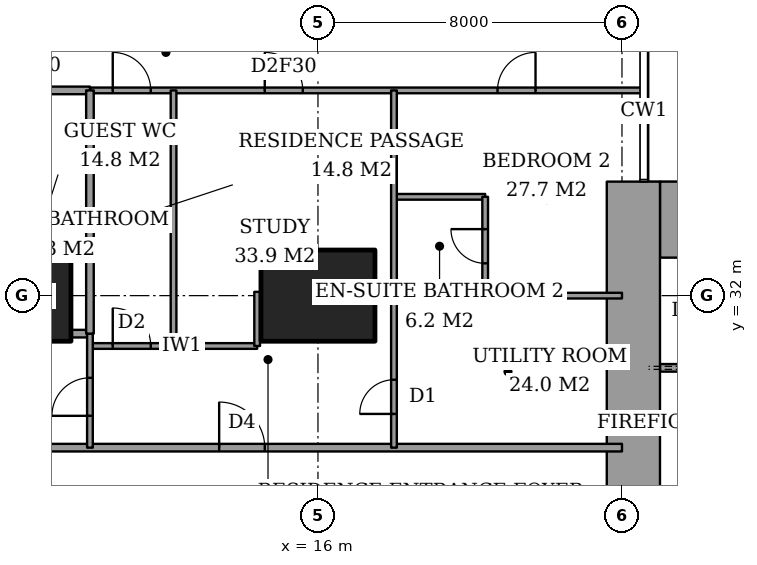
"""IFC4 building model, lengths in metres.
Left out: names, types, materials, properties, quantities, classifications, styles, units other than length and angle.
Written with IfcOpenShell. Run it as: python <this file> out.ifc"""

import sys

from ifc_helpers import new_model, si_unit, direction, frame, frame_2d, origin, origin_2d, place, context, subcontext, project, spatial, rectangle, extrude, element, fill, save


model = new_model("IFC4")
c1 = context("Model", 3, precision=1e-05, world=origin(), true_north=direction((0.0, 1.0)))
c2 = subcontext(c1, "Body", "Model", "MODEL_VIEW")
j1 = project(units=[si_unit("LENGTHUNIT", "METRE"), si_unit("PLANEANGLEUNIT", "RADIAN")], contexts=[c1])
p1 = place(None, origin())
s1 = spatial("IfcSite", under=j1, at=p1, CompositionType="ELEMENT")
p2 = place(p1, origin())
s2 = spatial("IfcBuilding", under=s1, at=p2, CompositionType="ELEMENT")
p3 = place(p2, frame((0.0, 0.0, 87.2)))
s3 = spatial("IfcBuildingStorey", under=s2, at=p3, CompositionType="ELEMENT", Elevation=87.2)
for number, where, z_axis, x_axis in (
    (1, (8.0, 32.0, 0.0), (0.0, 0.0, 1.0), (1.0, 0.0, 0.0)),
    (2, (16.0, 32.0, 0.0), (0.0, 0.0, 1.0), (1.0, 0.0, 0.0)),
):
    element("IfcColumn", number, at=place(p3, frame(where, z_axis=z_axis, x_axis=x_axis)), inside=s3, PredefinedType="COLUMN", context=c2, shape_type="SweptSolid", body=[
        extrude(rectangle(XDim=3.0, YDim=2.4, at=origin_2d()), origin(), (0.0, 0.0, 1.0), 3.6),
    ])
p4 = place(p3, frame((25.0, 34.0, 0.0), z_axis=(0.0, 0.0, 1.0), x_axis=(1.0, 0.0, 0.0)))
e3 = element("IfcWall", 3, at=p4, inside=s3, PredefinedType="SHEAR", context=c2, shape_type="SweptSolid", body=[
    extrude(rectangle(XDim=3.15, YDim=2.0, at=frame_2d((1.575, 0.0))), origin(), (0.0, 0.0, 1.0), 3.6),
])
p5 = place(p3, frame((24.3, 23.15, 0.0), z_axis=(0.0, 0.0, 1.0), x_axis=(0.0, 1.0, 0.0)))
e4 = element("IfcWall", 4, at=p5, inside=s3, PredefinedType="SHEAR", context=c2, shape_type="SweptSolid", body=[
    extrude(rectangle(XDim=11.85, YDim=1.4, at=frame_2d((5.925, 0.0))), origin(), (0.0, 0.0, 1.0), 3.6),
])
p6 = place(p5, frame((0.75, 0.0, 0.0)))
e5 = element("IfcOpeningElement", 5, at=p6, cuts=e4, PredefinedType="OPENING", context=c2, shape_type="SweptSolid", body=[
    extrude(rectangle(XDim=1.8, YDim=2.4, at=frame_2d((0.9, 1.2))), frame((0.0, 0.71, 0.0), z_axis=(0.0, -1.0, 0.0), x_axis=(1.0, 0.0, 0.0)), (0.0, 0.0, 1.0), 1.42),
])
p7 = place(p3, frame((6.725, 28.0, 0.0), z_axis=(0.0, 0.0, 1.0), x_axis=(1.0, 0.0, 0.0)))
e6 = element("IfcWall", 6, at=p7, inside=s3, PredefinedType="PARTITIONING", context=c2, shape_type="SweptSolid", body=[
    extrude(rectangle(XDim=17.275, YDim=0.2, at=frame_2d((8.637, 0.0))), origin(), (0.0, 0.0, 1.0), 3.25),
])
p8 = place(p7, frame((6.675, 0.0, 0.0)))
e7 = element("IfcOpeningElement", 7, at=p8, cuts=e6, PredefinedType="OPENING", context=c2, shape_type="SweptSolid", body=[
    extrude(rectangle(XDim=1.2, YDim=2.4, at=frame_2d((0.6, 1.2))), frame((0.0, 0.11, 0.0), z_axis=(0.0, -1.0, 0.0), x_axis=(1.0, 0.0, 0.0)), (0.0, 0.0, 1.0), 0.22),
])
p9 = place(p3, frame((10.0, 30.675, 0.0), z_axis=(0.0, 0.0, 1.0), x_axis=(1.0, 0.0, 0.0)))
e8 = element("IfcWall", 8, at=p9, inside=s3, PredefinedType="PARTITIONING", context=c2, shape_type="SweptSolid", body=[
    extrude(rectangle(XDim=4.4, YDim=0.15, at=frame_2d((2.2, 0.0))), origin(), (0.0, 0.0, 1.0), 3.25),
])
p10 = place(p9, frame((0.6, 0.0, 0.0)))
e9 = element("IfcOpeningElement", 9, at=p10, cuts=e8, PredefinedType="OPENING", context=c2, shape_type="SweptSolid", body=[
    extrude(rectangle(XDim=1.0, YDim=2.1, at=frame_2d((0.5, 1.05))), frame((0.0, 0.085, 0.0), z_axis=(0.0, -1.0, 0.0), x_axis=(1.0, 0.0, 0.0)), (0.0, 0.0, 1.0), 0.17),
])
p11 = place(p3, frame((9.5, 31.0, 0.0), z_axis=(0.0, 0.0, 1.0), x_axis=(1.0, 0.0, 0.0)))
e10 = element("IfcWall", 10, at=p11, inside=s3, PredefinedType="PARTITIONING", context=c2, shape_type="SweptSolid", body=[
    extrude(rectangle(XDim=0.5, YDim=0.2, at=frame_2d((0.25, 0.0))), origin(), (0.0, 0.0, 1.0), 3.25),
])
p12 = place(p3, frame((18.0, 32.0, 0.0), z_axis=(0.0, 0.0, 1.0), x_axis=(1.0, 0.0, 0.0)))
e11 = element("IfcWall", 11, at=p12, inside=s3, PredefinedType="PARTITIONING", context=c2, shape_type="SweptSolid", body=[
    extrude(rectangle(XDim=6.0, YDim=0.15, at=frame_2d((3.0, 0.0))), origin(), (0.0, 0.0, 1.0), 3.25),
])
p13 = place(p3, frame((17.5, 32.1, 0.0), z_axis=(0.0, 0.0, 1.0), x_axis=(1.0, 0.0, 0.0)))
e12 = element("IfcWall", 12, at=p13, inside=s3, PredefinedType="PARTITIONING", context=c2, shape_type="SweptSolid", body=[
    extrude(rectangle(XDim=0.5, YDim=0.15, at=frame_2d((0.25, 0.0))), origin(), (0.0, 0.0, 1.0), 3.25),
])
p14 = place(p3, frame((18.0, 34.6, 0.0), z_axis=(0.0, 0.0, 1.0), x_axis=(1.0, 0.0, 0.0)))
e13 = element("IfcWall", 13, at=p14, inside=s3, PredefinedType="PARTITIONING", context=c2, shape_type="SweptSolid", body=[
    extrude(rectangle(XDim=2.4, YDim=0.15, at=frame_2d((1.2, 0.0))), origin(), (0.0, 0.0, 1.0), 3.25),
])
p15 = place(p3, frame((6.725, 37.4, 0.0), z_axis=(0.0, 0.0, 1.0), x_axis=(1.0, 0.0, 0.0)))
e14 = element("IfcWall", 14, at=p15, inside=s3, PredefinedType="PARTITIONING", context=c2, shape_type="SweptSolid", body=[
    extrude(rectangle(XDim=3.275, YDim=0.2, at=frame_2d((1.637, 0.0))), origin(), (0.0, 0.0, 1.0), 3.25),
])
p16 = place(p15, frame((1.188, 0.0, 0.0)))
e15 = element("IfcOpeningElement", 15, at=p16, cuts=e14, PredefinedType="OPENING", context=c2, shape_type="SweptSolid", body=[
    extrude(rectangle(XDim=0.9, YDim=2.1, at=frame_2d((0.45, 1.05))), frame((0.0, 0.11, 0.0), z_axis=(0.0, -1.0, 0.0), x_axis=(1.0, 0.0, 0.0)), (0.0, 0.0, 1.0), 0.22),
])
p17 = place(p3, frame((10.0, 37.4, 0.0), z_axis=(0.0, 0.0, 1.0), x_axis=(1.0, 0.0, 0.0)))
e16 = element("IfcWall", 16, at=p17, inside=s3, PredefinedType="PARTITIONING", context=c2, shape_type="SweptSolid", body=[
    extrude(rectangle(XDim=14.561, YDim=0.15, at=frame_2d((7.281, 0.0))), origin(), (0.0, 0.0, 1.0), 3.25),
])
p18 = place(p17, frame((0.6, 0.0, 0.0)))
e17 = element("IfcOpeningElement", 17, at=p18, cuts=e16, PredefinedType="OPENING", context=c2, shape_type="SweptSolid", body=[
    extrude(rectangle(XDim=1.0, YDim=2.1, at=frame_2d((0.5, 1.05))), frame((0.0, 0.085, 0.0), z_axis=(0.0, -1.0, 0.0), x_axis=(1.0, 0.0, 0.0)), (0.0, 0.0, 1.0), 0.17),
])
p19 = place(p17, frame((4.6, 0.0, 0.0)))
e18 = element("IfcOpeningElement", 18, at=p19, cuts=e16, PredefinedType="OPENING", context=c2, shape_type="SweptSolid", body=[
    extrude(rectangle(XDim=1.0, YDim=2.1, at=frame_2d((0.5, 1.05))), frame((0.0, 0.085, 0.0), z_axis=(0.0, -1.0, 0.0), x_axis=(1.0, 0.0, 0.0)), (0.0, 0.0, 1.0), 0.17),
])
p20 = place(p17, frame((10.725, 0.0, 0.0)))
e19 = element("IfcOpeningElement", 19, at=p20, cuts=e16, PredefinedType="OPENING", context=c2, shape_type="SweptSolid", body=[
    extrude(rectangle(XDim=1.0, YDim=2.1, at=frame_2d((0.5, 1.05))), frame((0.0, 0.085, 0.0), z_axis=(0.0, -1.0, 0.0), x_axis=(1.0, 0.0, 0.0)), (0.0, 0.0, 1.0), 0.17),
])
p21 = place(p3, frame((10.0, 31.0, 0.0), z_axis=(0.0, 0.0, 1.0), x_axis=(0.0, 1.0, 0.0)))
e20 = element("IfcWall", 20, at=p21, inside=s3, PredefinedType="PARTITIONING", context=c2, shape_type="SweptSolid", body=[
    extrude(rectangle(XDim=6.4, YDim=0.2, at=frame_2d((3.2, 0.0))), origin(), (0.0, 0.0, 1.0), 3.25),
])
p22 = place(p3, frame((10.0, 28.0, 0.0), z_axis=(0.0, 0.0, 1.0), x_axis=(0.0, 1.0, 0.0)))
e21 = element("IfcWall", 21, at=p22, inside=s3, PredefinedType="PARTITIONING", context=c2, shape_type="SweptSolid", body=[
    extrude(rectangle(XDim=3.0, YDim=0.15, at=frame_2d((1.5, 0.0))), origin(), (0.0, 0.0, 1.0), 3.25),
])
p23 = place(p22, frame((0.837, 0.0, 0.0)))
e22 = element("IfcOpeningElement", 22, at=p23, cuts=e21, PredefinedType="OPENING", context=c2, shape_type="SweptSolid", body=[
    extrude(rectangle(XDim=1.0, YDim=2.1, at=frame_2d((0.5, 1.05))), frame((0.0, 0.085, 0.0), z_axis=(0.0, -1.0, 0.0), x_axis=(1.0, 0.0, 0.0)), (0.0, 0.0, 1.0), 0.17),
])
p24 = place(p3, frame((12.2, 30.675, 0.0), z_axis=(0.0, 0.0, 1.0), x_axis=(0.0, 1.0, 0.0)))
e23 = element("IfcWall", 23, at=p24, inside=s3, PredefinedType="PARTITIONING", context=c2, shape_type="SweptSolid", body=[
    extrude(rectangle(XDim=6.725, YDim=0.15, at=frame_2d((3.362, 0.0))), origin(), (0.0, 0.0, 1.0), 3.25),
])
p25 = place(p3, frame((14.4, 30.675, 0.0), z_axis=(0.0, 0.0, 1.0), x_axis=(0.0, 1.0, 0.0)))
e24 = element("IfcWall", 24, at=p25, inside=s3, PredefinedType="PARTITIONING", context=c2, shape_type="SweptSolid", body=[
    extrude(rectangle(XDim=1.425, YDim=0.15, at=frame_2d((0.712, 0.0))), origin(), (0.0, 0.0, 1.0), 3.25),
])
p26 = place(p3, frame((18.0, 28.0, 0.0), z_axis=(0.0, 0.0, 1.0), x_axis=(0.0, 1.0, 0.0)))
e25 = element("IfcWall", 25, at=p26, inside=s3, PredefinedType="PARTITIONING", context=c2, shape_type="SweptSolid", body=[
    extrude(rectangle(XDim=9.4, YDim=0.15, at=frame_2d((4.7, 0.0))), origin(), (0.0, 0.0, 1.0), 3.25),
])
p27 = place(p26, frame((0.887, 0.0, 0.0)))
e26 = element("IfcOpeningElement", 26, at=p27, cuts=e25, PredefinedType="OPENING", context=c2, shape_type="SweptSolid", body=[
    extrude(rectangle(XDim=0.9, YDim=2.1, at=frame_2d((0.45, 1.05))), frame((0.0, 0.085, 0.0), z_axis=(0.0, -1.0, 0.0), x_axis=(1.0, 0.0, 0.0)), (0.0, 0.0, 1.0), 0.17),
])
p28 = place(p3, frame((20.4, 32.0, 0.0), z_axis=(0.0, 0.0, 1.0), x_axis=(0.0, 1.0, 0.0)))
e27 = element("IfcWall", 27, at=p28, inside=s3, PredefinedType="PARTITIONING", context=c2, shape_type="SweptSolid", body=[
    extrude(rectangle(XDim=2.6, YDim=0.15, at=frame_2d((1.3, 0.0))), origin(), (0.0, 0.0, 1.0), 3.25),
])
p29 = place(p28, frame((0.85, 0.0, 0.0)))
e28 = element("IfcOpeningElement", 28, at=p29, cuts=e27, PredefinedType="OPENING", context=c2, shape_type="SweptSolid", body=[
    extrude(rectangle(XDim=0.9, YDim=2.1, at=frame_2d((0.45, 1.05))), frame((0.0, 0.085, 0.0), z_axis=(0.0, -1.0, 0.0), x_axis=(1.0, 0.0, 0.0)), (0.0, 0.0, 1.0), 0.17),
])
p30 = place(p3, frame((25.0, 30.1, 0.0), z_axis=(0.0, 0.0, 1.0), x_axis=(1.0, 0.0, 0.0)))
e29 = element("IfcWall", 29, at=p30, inside=s3, PredefinedType="PARTITIONING", context=c2, shape_type="SweptSolid", body=[
    extrude(rectangle(XDim=12.7, YDim=0.2, at=frame_2d((6.35, 0.0))), origin(), (0.0, 0.0, 1.0), 3.6),
])
p31 = place(p30, frame((0.9, 0.0, 0.0)))
e30 = element("IfcOpeningElement", 30, at=p31, cuts=e29, PredefinedType="OPENING", context=c2, shape_type="SweptSolid", body=[
    extrude(rectangle(XDim=1.2, YDim=2.1, at=frame_2d((0.6, 1.05))), frame((0.0, 0.11, 0.0), z_axis=(0.0, -1.0, 0.0), x_axis=(1.0, 0.0, 0.0)), (0.0, 0.0, 1.0), 0.22),
])
p32 = place(p18, origin())
e31 = element("IfcDoor", 31, at=p32, inside=s3, OperationType="SINGLE_SWING_RIGHT", PredefinedType="DOOR", context=c2, shape_type="SweptSolid", body=[
    extrude(rectangle(XDim=1.0, YDim=2.1, at=frame_2d((0.5, 1.05))), frame((0.0, 0.025, 0.0), z_axis=(0.0, -1.0, 0.0), x_axis=(1.0, 0.0, 0.0)), (0.0, 0.0, 1.0), 0.05),
])
fill(e17, e31)
p33 = place(p23, origin())
e32 = element("IfcDoor", 32, at=p33, inside=s3, OperationType="SINGLE_SWING_RIGHT", PredefinedType="DOOR", context=c2, shape_type="SweptSolid", body=[
    extrude(rectangle(XDim=1.0, YDim=2.1, at=frame_2d((0.5, 1.05))), frame((0.0, 0.025, 0.0), z_axis=(0.0, -1.0, 0.0), x_axis=(1.0, 0.0, 0.0)), (0.0, 0.0, 1.0), 0.05),
])
fill(e22, e32)
p34 = place(p8, origin())
e33 = element("IfcDoor", 33, at=p34, inside=s3, OperationType="SINGLE_SWING_RIGHT", PredefinedType="DOOR", context=c2, shape_type="SweptSolid", body=[
    extrude(rectangle(XDim=1.2, YDim=2.4, at=frame_2d((0.6, 1.2))), frame((0.0, 0.025, 0.0), z_axis=(0.0, -1.0, 0.0), x_axis=(1.0, 0.0, 0.0)), (0.0, 0.0, 1.0), 0.05),
])
fill(e7, e33)
p35 = place(p10, origin())
e34 = element("IfcDoor", 34, at=p35, inside=s3, OperationType="SINGLE_SWING_RIGHT", PredefinedType="DOOR", context=c2, shape_type="SweptSolid", body=[
    extrude(rectangle(XDim=1.0, YDim=2.1, at=frame_2d((0.5, 1.05))), frame((0.0, 0.025, 0.0), z_axis=(0.0, -1.0, 0.0), x_axis=(1.0, 0.0, 0.0)), (0.0, 0.0, 1.0), 0.05),
])
fill(e9, e34)
p36 = place(p19, origin())
e35 = element("IfcDoor", 35, at=p36, inside=s3, OperationType="SINGLE_SWING_RIGHT", PredefinedType="DOOR", context=c2, shape_type="SweptSolid", body=[
    extrude(rectangle(XDim=1.0, YDim=2.1, at=frame_2d((0.5, 1.05))), frame((0.0, 0.025, 0.0), z_axis=(0.0, -1.0, 0.0), x_axis=(1.0, 0.0, 0.0)), (0.0, 0.0, 1.0), 0.05),
])
fill(e18, e35)
p37 = place(p29, origin())
e36 = element("IfcDoor", 36, at=p37, inside=s3, OperationType="SINGLE_SWING_LEFT", PredefinedType="DOOR", context=c2, shape_type="SweptSolid", body=[
    extrude(rectangle(XDim=0.9, YDim=2.1, at=frame_2d((0.45, 1.05))), frame((0.0, 0.025, 0.0), z_axis=(0.0, -1.0, 0.0), x_axis=(1.0, 0.0, 0.0)), (0.0, 0.0, 1.0), 0.05),
])
fill(e28, e36)
p38 = place(p20, origin())
e37 = element("IfcDoor", 37, at=p38, inside=s3, OperationType="SINGLE_SWING_LEFT", PredefinedType="DOOR", context=c2, shape_type="SweptSolid", body=[
    extrude(rectangle(XDim=1.0, YDim=2.1, at=frame_2d((0.5, 1.05))), frame((0.0, 0.025, 0.0), z_axis=(0.0, -1.0, 0.0), x_axis=(1.0, 0.0, 0.0)), (0.0, 0.0, 1.0), 0.05),
])
fill(e19, e37)
p39 = place(p27, origin())
e38 = element("IfcDoor", 38, at=p39, inside=s3, OperationType="SINGLE_SWING_RIGHT", PredefinedType="DOOR", context=c2, shape_type="SweptSolid", body=[
    extrude(rectangle(XDim=0.9, YDim=2.1, at=frame_2d((0.45, 1.05))), frame((0.0, 0.025, 0.0), z_axis=(0.0, -1.0, 0.0), x_axis=(1.0, 0.0, 0.0)), (0.0, 0.0, 1.0), 0.05),
])
fill(e26, e38)
save(model, sys.argv[1])
